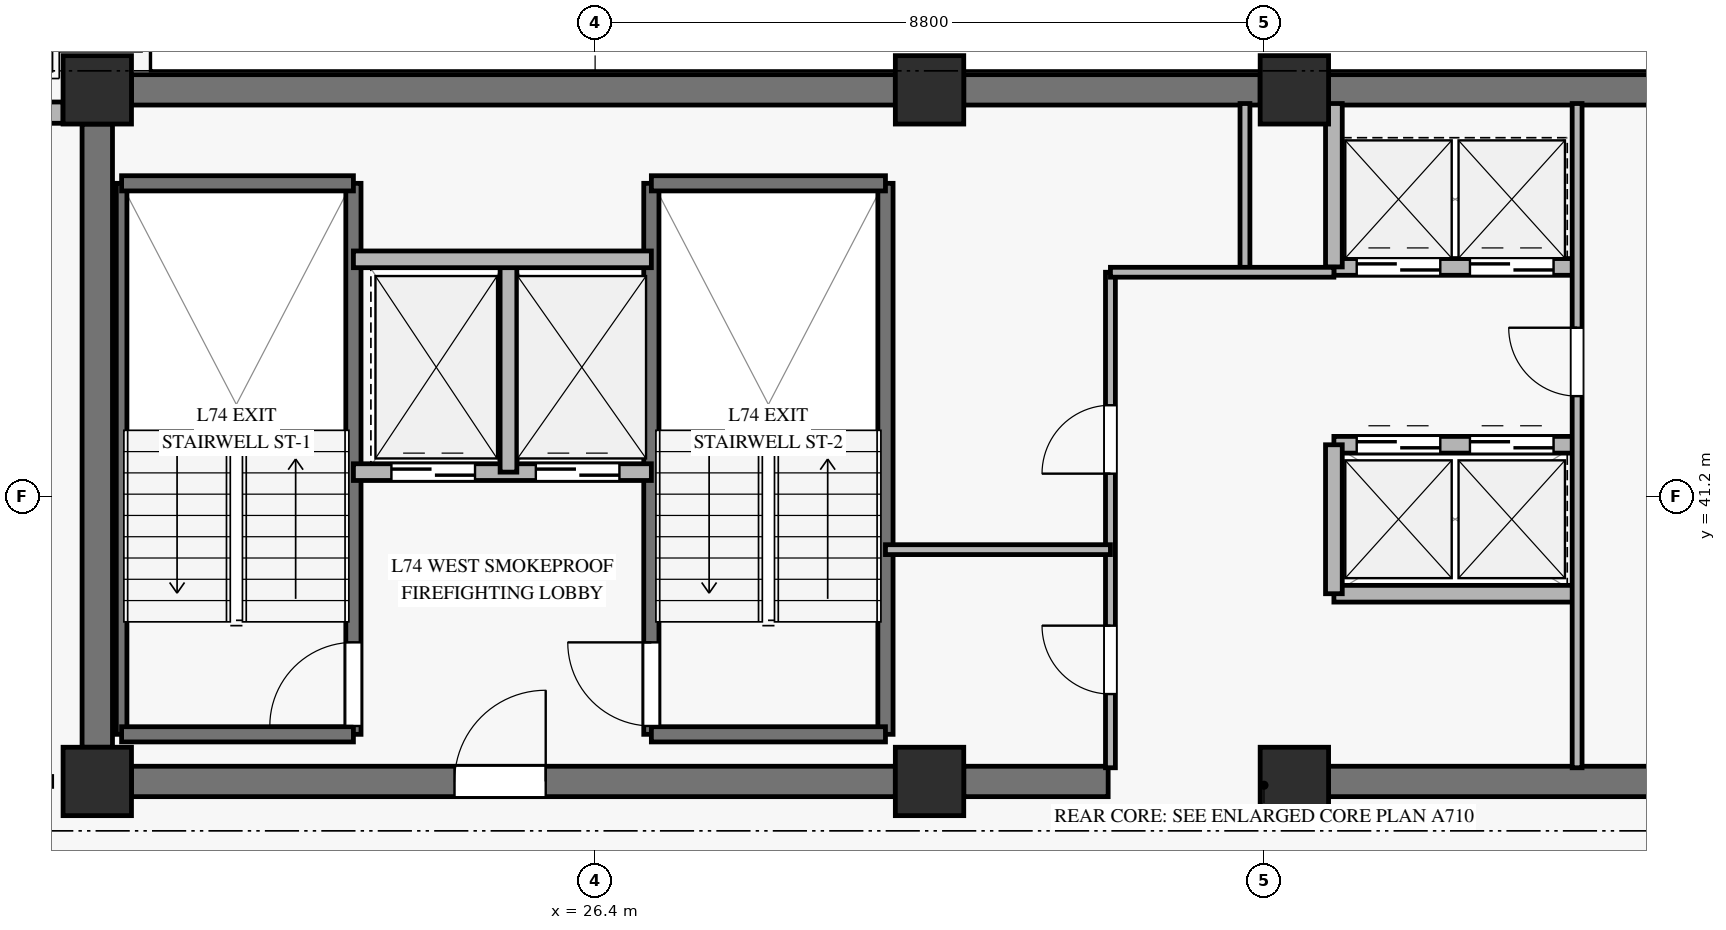
"""IFC4 building model, lengths in metres.
Left out: names, types, materials, properties, quantities, classifications, styles, units other than length and angle.
Written with IfcOpenShell. Run it as: python <this file> out.ifc"""

import sys

from ifc_helpers import new_model, si_unit, direction, frame, frame_2d, origin, origin_2d, place, context, subcontext, project, spatial, rectangle, extrude, source, transform, mapped, element, fill, save


model = new_model("IFC4")
c1 = context("Model", 3, precision=1e-05, world=origin(), true_north=direction((0.0, 1.0)))
c2 = subcontext(c1, "Body", "Model", "MODEL_VIEW")
j1 = project(units=[si_unit("LENGTHUNIT", "METRE"), si_unit("PLANEANGLEUNIT", "RADIAN")], contexts=[c1])
p1 = place(None, origin())
s1 = spatial("IfcSite", under=j1, at=p1, CompositionType="ELEMENT")
p2 = place(p1, origin())
s2 = spatial("IfcBuilding", under=s1, at=p2, CompositionType="ELEMENT")
p3 = place(p2, frame((0.0, 0.0, 290.4)))
s3 = spatial("IfcBuildingStorey", under=s2, at=p3, CompositionType="ELEMENT", Elevation=290.4)
m1 = source(origin(), c2, "Body", "SweptSolid", [
    extrude(rectangle(XDim=0.9, YDim=0.9, at=origin_2d()), origin(), (0.0, 0.0, 1.0), 3.185),
])
for number, where, z_axis, x_axis in (
    (1, (19.85, 37.45, 0.0), (0.0, 0.0, 1.0), (1.0, 0.0, 0.0)),
    (2, (19.85, 46.55, 0.0), (0.0, 0.0, 1.0), (1.0, 0.0, 0.0)),
    (3, (30.8, 37.45, 0.0), (0.0, 0.0, 1.0), (1.0, 0.0, 0.0)),
    (4, (30.8, 46.55, 0.0), (0.0, 0.0, 1.0), (1.0, 0.0, 0.0)),
    (5, (35.6, 37.45, 0.0), (0.0, 0.0, 1.0), (1.0, 0.0, 0.0)),
    (6, (35.6, 46.55, 0.0), (0.0, 0.0, 1.0), (1.0, 0.0, 0.0)),
):
    element("IfcColumn", number, at=place(p3, frame(where, z_axis=z_axis, x_axis=x_axis)), inside=s3, PredefinedType="PILASTER", context=c2, shape_type="MappedRepresentation", body=[
        mapped(m1, transform((0.0, 0.0, 0.0), x_axis=(1.0, 0.0, 0.0), y_axis=(0.0, 1.0, 0.0), z_axis=(0.0, 0.0, 1.0), scale=1.0)),
    ])
p4 = place(p3, frame((20.3, 46.55, 0.0), z_axis=(0.0, 0.0, 1.0), x_axis=(1.0, 0.0, 0.0)))
e7 = element("IfcWall", 7, at=p4, inside=s3, PredefinedType="SHEAR", context=c2, shape_type="SweptSolid", body=[
    extrude(rectangle(XDim=10.05, YDim=0.4, at=frame_2d((5.025, 0.0))), origin(), (0.0, 0.0, 1.0), 3.185),
])
p5 = place(p3, frame((31.25, 46.55, 0.0), z_axis=(0.0, 0.0, 1.0), x_axis=(1.0, 0.0, 0.0)))
e8 = element("IfcWall", 8, at=p5, inside=s3, PredefinedType="SHEAR", context=c2, shape_type="SweptSolid", body=[
    extrude(rectangle(XDim=3.9, YDim=0.4, at=frame_2d((1.95, 0.0))), origin(), (0.0, 0.0, 1.0), 3.185),
])
p6 = place(p3, frame((36.05, 46.55, 0.0), z_axis=(0.0, 0.0, 1.0), x_axis=(1.0, 0.0, 0.0)))
e9 = element("IfcWall", 9, at=p6, inside=s3, PredefinedType="SHEAR", context=c2, shape_type="SweptSolid", body=[
    extrude(rectangle(XDim=7.8, YDim=0.4, at=frame_2d((3.9, 0.0))), origin(), (0.0, 0.0, 1.0), 3.185),
])
p7 = place(p3, frame((20.3, 37.45, 0.0), z_axis=(0.0, 0.0, 1.0), x_axis=(1.0, 0.0, 0.0)))
e10 = element("IfcWall", 10, at=p7, inside=s3, PredefinedType="SHEAR", context=c2, shape_type="SweptSolid", body=[
    extrude(rectangle(XDim=10.05, YDim=0.4, at=frame_2d((5.025, 0.0))), origin(), (0.0, 0.0, 1.0), 3.185),
])
p8 = place(p7, frame((4.25, 0.0, 0.0)))
e11 = element("IfcOpeningElement", 11, at=p8, cuts=e10, PredefinedType="OPENING", context=c2, shape_type="SweptSolid", body=[
    extrude(rectangle(XDim=1.2, YDim=2.15, at=frame_2d((0.6, 1.075))), frame((0.0, 0.21, 0.0), z_axis=(0.0, -1.0, 0.0), x_axis=(1.0, 0.0, 0.0)), (0.0, 0.0, 1.0), 0.42),
])
p9 = place(p3, frame((31.25, 37.45, 0.0), z_axis=(0.0, 0.0, 1.0), x_axis=(1.0, 0.0, 0.0)))
e12 = element("IfcWall", 12, at=p9, inside=s3, PredefinedType="SHEAR", context=c2, shape_type="SweptSolid", body=[
    extrude(rectangle(XDim=1.9, YDim=0.4, at=frame_2d((0.95, 0.0))), origin(), (0.0, 0.0, 1.0), 3.185),
])
p10 = place(p3, frame((36.05, 37.45, 0.0), z_axis=(0.0, 0.0, 1.0), x_axis=(1.0, 0.0, 0.0)))
e13 = element("IfcWall", 13, at=p10, inside=s3, PredefinedType="SHEAR", context=c2, shape_type="SweptSolid", body=[
    extrude(rectangle(XDim=7.8, YDim=0.4, at=frame_2d((3.9, 0.0))), origin(), (0.0, 0.0, 1.0), 3.185),
])
p11 = place(p3, frame((19.85, 37.9, 0.0), z_axis=(0.0, 0.0, 1.0), x_axis=(0.0, 1.0, 0.0)))
e14 = element("IfcWall", 14, at=p11, inside=s3, PredefinedType="SHEAR", context=c2, shape_type="SweptSolid", body=[
    extrude(rectangle(XDim=8.2, YDim=0.4, at=frame_2d((4.1, 0.0))), origin(), (0.0, 0.0, 1.0), 3.185),
])
p12 = place(p3, frame((12.311, 46.25, 0.0), z_axis=(0.0, 0.0, 1.0), x_axis=(1.0, 0.0, 0.0)))
e15 = element("IfcWall", 15, at=p12, inside=s3, PredefinedType="SOLIDWALL", context=c2, shape_type="SweptSolid", body=[
    extrude(rectangle(XDim=7.089, YDim=0.28, at=frame_2d((3.544, 0.0))), origin(), (0.0, 0.0, 1.0), 2.815),
])
p13 = place(p12, frame((2.744, 0.0, 0.45)))
e16 = element("IfcOpeningElement", 16, at=p13, cuts=e15, PredefinedType="OPENING", context=c2, shape_type="SweptSolid", body=[
    extrude(rectangle(XDim=1.6, YDim=2.0, at=frame_2d((0.8, 1.0))), frame((0.0, 0.15, 0.0), z_axis=(0.0, -1.0, 0.0), x_axis=(1.0, 0.0, 0.0)), (0.0, 0.0, 1.0), 0.3),
])
p14 = place(p3, frame((20.17, 38.07, 0.0), z_axis=(0.0, 0.0, 1.0), x_axis=(0.0, 1.0, 0.0)))
e17 = element("IfcWall", 17, at=p14, inside=s3, PredefinedType="SOLIDWALL", context=c2, shape_type="SweptSolid", body=[
    extrude(rectangle(XDim=7.25, YDim=0.14, at=frame_2d((3.625, 0.0))), origin(), (0.0, 0.0, 1.0), 3.4),
])
p15 = place(p3, frame((23.22, 38.07, 0.0), z_axis=(0.0, 0.0, 1.0), x_axis=(0.0, 1.0, 0.0)))
e18 = element("IfcWall", 18, at=p15, inside=s3, PredefinedType="SOLIDWALL", context=c2, shape_type="SweptSolid", body=[
    extrude(rectangle(XDim=7.25, YDim=0.2, at=frame_2d((3.625, 0.0))), origin(), (0.0, 0.0, 1.0), 3.4),
])
p16 = place(p15, frame((0.11, 0.0, 0.0)))
e19 = element("IfcOpeningElement", 19, at=p16, cuts=e18, PredefinedType="OPENING", context=c2, shape_type="SweptSolid", body=[
    extrude(rectangle(XDim=1.1, YDim=2.15, at=frame_2d((0.55, 1.075))), frame((0.0, 0.11, 0.0), z_axis=(0.0, -1.0, 0.0), x_axis=(1.0, 0.0, 0.0)), (0.0, 0.0, 1.0), 0.22),
])
for number, where, z_axis, x_axis in (
    (20, (20.17, 45.32, 0.0), (0.0, 0.0, 1.0), (1.0, 0.0, 0.0)),
    (21, (20.17, 38.07, 0.0), (0.0, 0.0, 1.0), (1.0, 0.0, 0.0)),
):
    element("IfcWall", number, at=place(p3, frame(where, z_axis=z_axis, x_axis=x_axis)), inside=s3, PredefinedType="SOLIDWALL", context=c2, shape_type="SweptSolid", body=[
        extrude(rectangle(XDim=3.05, YDim=0.2, at=frame_2d((1.525, 0.0))), origin(), (0.0, 0.0, 1.0), 3.4),
    ])
p17 = place(p3, frame((27.14, 38.07, 0.0), z_axis=(0.0, 0.0, 1.0), x_axis=(0.0, 1.0, 0.0)))
e22 = element("IfcWall", 22, at=p17, inside=s3, PredefinedType="SOLIDWALL", context=c2, shape_type="SweptSolid", body=[
    extrude(rectangle(XDim=7.25, YDim=0.2, at=frame_2d((3.625, 0.0))), origin(), (0.0, 0.0, 1.0), 3.4),
])
p18 = place(p17, frame((0.11, 0.0, 0.0)))
e23 = element("IfcOpeningElement", 23, at=p18, cuts=e22, PredefinedType="OPENING", context=c2, shape_type="SweptSolid", body=[
    extrude(rectangle(XDim=1.1, YDim=2.15, at=frame_2d((0.55, 1.075))), frame((0.0, 0.11, 0.0), z_axis=(0.0, -1.0, 0.0), x_axis=(1.0, 0.0, 0.0)), (0.0, 0.0, 1.0), 0.22),
])
p19 = place(p3, frame((30.22, 38.07, 0.0), z_axis=(0.0, 0.0, 1.0), x_axis=(0.0, 1.0, 0.0)))
e24 = element("IfcWall", 24, at=p19, inside=s3, PredefinedType="SOLIDWALL", context=c2, shape_type="SweptSolid", body=[
    extrude(rectangle(XDim=7.25, YDim=0.2, at=frame_2d((3.625, 0.0))), origin(), (0.0, 0.0, 1.0), 3.4),
])
for number, where, z_axis, x_axis in (
    (25, (27.14, 45.32, 0.0), (0.0, 0.0, 1.0), (1.0, 0.0, 0.0)),
    (26, (27.14, 38.07, 0.0), (0.0, 0.0, 1.0), (1.0, 0.0, 0.0)),
):
    element("IfcWall", number, at=place(p3, frame(where, z_axis=z_axis, x_axis=x_axis)), inside=s3, PredefinedType="SOLIDWALL", context=c2, shape_type="SweptSolid", body=[
        extrude(rectangle(XDim=3.08, YDim=0.2, at=frame_2d((1.54, 0.0))), origin(), (0.0, 0.0, 1.0), 3.4),
    ])
p20 = place(p3, frame((23.22, 41.52, 0.0), z_axis=(0.0, 0.0, 1.0), x_axis=(1.0, 0.0, 0.0)))
e27 = element("IfcWall", 27, at=p20, inside=s3, PredefinedType="SOLIDWALL", context=c2, shape_type="SweptSolid", body=[
    extrude(rectangle(XDim=3.92, YDim=0.22, at=frame_2d((1.96, 0.0))), origin(), (0.0, 0.0, 1.0), 3.185),
])
p21 = place(p20, frame((0.5, 0.0, 0.0)))
e28 = element("IfcOpeningElement", 28, at=p21, cuts=e27, PredefinedType="OPENING", context=c2, shape_type="SweptSolid", body=[
    extrude(rectangle(XDim=1.1, YDim=2.2, at=frame_2d((0.55, 1.1))), frame((0.0, 0.12, 0.0), z_axis=(0.0, -1.0, 0.0), x_axis=(1.0, 0.0, 0.0)), (0.0, 0.0, 1.0), 0.24),
])
p22 = place(p20, frame((2.4, 0.0, 0.0)))
e29 = element("IfcOpeningElement", 29, at=p22, cuts=e27, PredefinedType="OPENING", context=c2, shape_type="SweptSolid", body=[
    extrude(rectangle(XDim=1.1, YDim=2.2, at=frame_2d((0.55, 1.1))), frame((0.0, 0.12, 0.0), z_axis=(0.0, -1.0, 0.0), x_axis=(1.0, 0.0, 0.0)), (0.0, 0.0, 1.0), 0.24),
])
p23 = place(p3, frame((25.26, 41.52, 0.0), z_axis=(0.0, 0.0, 1.0), x_axis=(0.0, 1.0, 0.0)))
e30 = element("IfcWall", 30, at=p23, inside=s3, PredefinedType="SOLIDWALL", context=c2, shape_type="SweptSolid", body=[
    extrude(rectangle(XDim=2.8, YDim=0.22, at=frame_2d((1.4, 0.0))), origin(), (0.0, 0.0, 1.0), 3.185),
])
p24 = place(p3, frame((23.22, 44.32, 0.0), z_axis=(0.0, 0.0, 1.0), x_axis=(1.0, 0.0, 0.0)))
e31 = element("IfcWall", 31, at=p24, inside=s3, PredefinedType="SOLIDWALL", context=c2, shape_type="SweptSolid", body=[
    extrude(rectangle(XDim=3.92, YDim=0.22, at=frame_2d((1.96, 0.0))), origin(), (0.0, 0.0, 1.0), 3.185),
])
p25 = place(p3, frame((36.12, 44.22, 0.0), z_axis=(0.0, 0.0, 1.0), x_axis=(1.0, 0.0, 0.0)))
e32 = element("IfcWall", 32, at=p25, inside=s3, PredefinedType="SOLIDWALL", context=c2, shape_type="SweptSolid", body=[
    extrude(rectangle(XDim=3.2, YDim=0.22, at=frame_2d((1.6, 0.0))), origin(), (0.0, 0.0, 1.0), 3.185),
])
p26 = place(p25, frame((0.3, 0.0, 0.0)))
e33 = element("IfcOpeningElement", 33, at=p26, cuts=e32, PredefinedType="OPENING", context=c2, shape_type="SweptSolid", body=[
    extrude(rectangle(XDim=1.1, YDim=2.2, at=frame_2d((0.55, 1.1))), frame((0.0, 0.12, 0.0), z_axis=(0.0, -1.0, 0.0), x_axis=(1.0, 0.0, 0.0)), (0.0, 0.0, 1.0), 0.24),
])
p27 = place(p25, frame((1.79, 0.0, 0.0)))
e34 = element("IfcOpeningElement", 34, at=p27, cuts=e32, PredefinedType="OPENING", context=c2, shape_type="SweptSolid", body=[
    extrude(rectangle(XDim=1.1, YDim=2.2, at=frame_2d((0.55, 1.1))), frame((0.0, 0.12, 0.0), z_axis=(0.0, -1.0, 0.0), x_axis=(1.0, 0.0, 0.0)), (0.0, 0.0, 1.0), 0.24),
])
p28 = place(p3, frame((36.12, 41.88, 0.0), z_axis=(0.0, 0.0, 1.0), x_axis=(1.0, 0.0, 0.0)))
e35 = element("IfcWall", 35, at=p28, inside=s3, PredefinedType="SOLIDWALL", context=c2, shape_type="SweptSolid", body=[
    extrude(rectangle(XDim=3.2, YDim=0.22, at=frame_2d((1.6, 0.0))), origin(), (0.0, 0.0, 1.0), 3.185),
])
p29 = place(p28, frame((0.3, 0.0, 0.0)))
e36 = element("IfcOpeningElement", 36, at=p29, cuts=e35, PredefinedType="OPENING", context=c2, shape_type="SweptSolid", body=[
    extrude(rectangle(XDim=1.1, YDim=2.2, at=frame_2d((0.55, 1.1))), frame((0.0, 0.12, 0.0), z_axis=(0.0, -1.0, 0.0), x_axis=(1.0, 0.0, 0.0)), (0.0, 0.0, 1.0), 0.24),
])
p30 = place(p28, frame((1.79, 0.0, 0.0)))
e37 = element("IfcOpeningElement", 37, at=p30, cuts=e35, PredefinedType="OPENING", context=c2, shape_type="SweptSolid", body=[
    extrude(rectangle(XDim=1.1, YDim=2.2, at=frame_2d((0.55, 1.1))), frame((0.0, 0.12, 0.0), z_axis=(0.0, -1.0, 0.0), x_axis=(1.0, 0.0, 0.0)), (0.0, 0.0, 1.0), 0.24),
])
p31 = place(p3, frame((36.12, 39.92, 0.0), z_axis=(0.0, 0.0, 1.0), x_axis=(1.0, 0.0, 0.0)))
e38 = element("IfcWall", 38, at=p31, inside=s3, PredefinedType="SOLIDWALL", context=c2, shape_type="SweptSolid", body=[
    extrude(rectangle(XDim=3.2, YDim=0.22, at=frame_2d((1.6, 0.0))), origin(), (0.0, 0.0, 1.0), 3.185),
])
p32 = place(p3, frame((36.12, 39.92, 0.0), z_axis=(0.0, 0.0, 1.0), x_axis=(0.0, 1.0, 0.0)))
e39 = element("IfcWall", 39, at=p32, inside=s3, PredefinedType="SOLIDWALL", context=c2, shape_type="SweptSolid", body=[
    extrude(rectangle(XDim=1.96, YDim=0.22, at=frame_2d((0.98, 0.0))), origin(), (0.0, 0.0, 1.0), 3.185),
])
p33 = place(p3, frame((36.12, 44.22, 0.0), z_axis=(0.0, 0.0, 1.0), x_axis=(0.0, 1.0, 0.0)))
e40 = element("IfcWall", 40, at=p33, inside=s3, PredefinedType="SOLIDWALL", context=c2, shape_type="SweptSolid", body=[
    extrude(rectangle(XDim=2.15, YDim=0.22, at=frame_2d((1.075, 0.0))), origin(), (0.0, 0.0, 1.0), 3.185),
])
p34 = place(p3, frame((33.18, 37.63, 0.0), z_axis=(0.0, 0.0, 1.0), x_axis=(0.0, 1.0, 0.0)))
e41 = element("IfcWall", 41, at=p34, inside=s3, PredefinedType="PARTITIONING", context=c2, shape_type="SweptSolid", body=[
    extrude(rectangle(XDim=6.52, YDim=0.13, at=frame_2d((3.26, 0.0))), origin(), (0.0, 0.0, 1.0), 2.27),
])
p35 = place(p34, frame((0.97, 0.0, 0.0)))
e42 = element("IfcOpeningElement", 42, at=p35, cuts=e41, PredefinedType="OPENING", context=c2, shape_type="SweptSolid", body=[
    extrude(rectangle(XDim=0.9, YDim=2.1, at=frame_2d((0.45, 1.05))), frame((0.0, 0.075, 0.0), z_axis=(0.0, -1.0, 0.0), x_axis=(1.0, 0.0, 0.0)), (0.0, 0.0, 1.0), 0.15),
])
p36 = place(p34, frame((3.87, 0.0, 0.0)))
e43 = element("IfcOpeningElement", 43, at=p36, cuts=e41, PredefinedType="OPENING", context=c2, shape_type="SweptSolid", body=[
    extrude(rectangle(XDim=0.9, YDim=2.1, at=frame_2d((0.45, 1.05))), frame((0.0, 0.075, 0.0), z_axis=(0.0, -1.0, 0.0), x_axis=(1.0, 0.0, 0.0)), (0.0, 0.0, 1.0), 0.15),
])
p37 = place(p3, frame((34.95, 44.15, 0.0), z_axis=(0.0, 0.0, 1.0), x_axis=(0.0, 1.0, 0.0)))
e44 = element("IfcWall", 44, at=p37, inside=s3, PredefinedType="PARTITIONING", context=c2, shape_type="SweptSolid", body=[
    extrude(rectangle(XDim=2.22, YDim=0.13, at=frame_2d((1.11, 0.0))), origin(), (0.0, 0.0, 1.0), 3.185),
])
p38 = place(p3, frame((33.18, 44.15, 0.0), z_axis=(0.0, 0.0, 1.0), x_axis=(1.0, 0.0, 0.0)))
e45 = element("IfcWall", 45, at=p38, inside=s3, PredefinedType="PARTITIONING", context=c2, shape_type="SweptSolid", body=[
    extrude(rectangle(XDim=2.94, YDim=0.13, at=frame_2d((1.47, 0.0))), origin(), (0.0, 0.0, 1.0), 2.47),
])
p39 = place(p3, frame((39.32, 37.63, 0.0), z_axis=(0.0, 0.0, 1.0), x_axis=(0.0, 1.0, 0.0)))
e46 = element("IfcWall", 46, at=p39, inside=s3, PredefinedType="PARTITIONING", context=c2, shape_type="SweptSolid", body=[
    extrude(rectangle(XDim=8.74, YDim=0.13, at=frame_2d((4.37, 0.0))), origin(), (0.0, 0.0, 1.0), 3.185),
])
p40 = place(p39, frame((4.89, 0.0, 0.0)))
e47 = element("IfcOpeningElement", 47, at=p40, cuts=e46, PredefinedType="OPENING", context=c2, shape_type="SweptSolid", body=[
    extrude(rectangle(XDim=0.9, YDim=2.1, at=frame_2d((0.45, 1.05))), frame((0.0, 0.075, 0.0), z_axis=(0.0, -1.0, 0.0), x_axis=(1.0, 0.0, 0.0)), (0.0, 0.0, 1.0), 0.15),
])
p41 = place(p3, frame((30.22, 40.5, 0.0), z_axis=(0.0, 0.0, 1.0), x_axis=(1.0, 0.0, 0.0)))
e48 = element("IfcWall", 48, at=p41, inside=s3, PredefinedType="PARTITIONING", context=c2, shape_type="SweptSolid", body=[
    extrude(rectangle(XDim=2.96, YDim=0.13, at=frame_2d((1.48, 0.0))), origin(), (0.0, 0.0, 1.0), 2.47),
])
m2 = source(origin(), c2, "Body", "SweptSolid", [
    extrude(rectangle(XDim=1.1, YDim=2.15, at=frame_2d((0.55, 1.075))), frame((0.0, 0.025, 0.0), z_axis=(0.0, -1.0, 0.0), x_axis=(1.0, 0.0, 0.0)), (0.0, 0.0, 1.0), 0.05),
])
p42 = place(p16, origin())
e49 = element("IfcDoor", 49, at=p42, inside=s3, OperationType="SINGLE_SWING_LEFT", PredefinedType="DOOR", context=c2, shape_type="MappedRepresentation", body=[
    mapped(m2, transform((0.0, 0.0, 0.0), x_axis=(1.0, 0.0, 0.0), y_axis=(0.0, 1.0, 0.0), z_axis=(0.0, 0.0, 1.0), scale=1.0)),
])
fill(e19, e49)
p43 = place(p18, origin())
e50 = element("IfcDoor", 50, at=p43, inside=s3, OperationType="SINGLE_SWING_RIGHT", PredefinedType="DOOR", context=c2, shape_type="MappedRepresentation", body=[
    mapped(m2, transform((0.0, 0.0, 0.0), x_axis=(1.0, 0.0, 0.0), y_axis=(0.0, 1.0, 0.0), z_axis=(0.0, 0.0, 1.0), scale=1.0)),
])
fill(e23, e50)
m3 = source(origin(), c2, "Body", "SweptSolid", [
    extrude(rectangle(XDim=1.1, YDim=2.2, at=frame_2d((0.55, 1.1))), frame((0.0, 0.025, 0.0), z_axis=(0.0, -1.0, 0.0), x_axis=(1.0, 0.0, 0.0)), (0.0, 0.0, 1.0), 0.05),
])
p44 = place(p21, origin())
e51 = element("IfcDoor", 51, at=p44, inside=s3, OperationType="SLIDING_TO_LEFT", PredefinedType="DOOR", context=c2, shape_type="MappedRepresentation", body=[
    mapped(m3, transform((0.0, 0.0, 0.0), x_axis=(1.0, 0.0, 0.0), y_axis=(0.0, 1.0, 0.0), z_axis=(0.0, 0.0, 1.0), scale=1.0)),
])
fill(e28, e51)
p45 = place(p22, origin())
e52 = element("IfcDoor", 52, at=p45, inside=s3, OperationType="SLIDING_TO_LEFT", PredefinedType="DOOR", context=c2, shape_type="MappedRepresentation", body=[
    mapped(m3, transform((0.0, 0.0, 0.0), x_axis=(1.0, 0.0, 0.0), y_axis=(0.0, 1.0, 0.0), z_axis=(0.0, 0.0, 1.0), scale=1.0)),
])
fill(e29, e52)
m4 = source(origin(), c2, "Body", "SweptSolid", [
    extrude(rectangle(XDim=1.2, YDim=2.15, at=frame_2d((0.6, 1.075))), frame((0.0, 0.025, 0.0), z_axis=(0.0, -1.0, 0.0), x_axis=(1.0, 0.0, 0.0)), (0.0, 0.0, 1.0), 0.05),
])
p46 = place(p8, origin())
e53 = element("IfcDoor", 53, at=p46, inside=s3, OperationType="SINGLE_SWING_RIGHT", PredefinedType="DOOR", context=c2, shape_type="MappedRepresentation", body=[
    mapped(m4, transform((0.0, 0.0, 0.0), x_axis=(1.0, 0.0, 0.0), y_axis=(0.0, 1.0, 0.0), z_axis=(0.0, 0.0, 1.0), scale=1.0)),
])
fill(e11, e53)
p47 = place(p26, origin())
e54 = element("IfcDoor", 54, at=p47, inside=s3, OperationType="SLIDING_TO_LEFT", PredefinedType="DOOR", context=c2, shape_type="MappedRepresentation", body=[
    mapped(m3, transform((0.0, 0.0, 0.0), x_axis=(1.0, 0.0, 0.0), y_axis=(0.0, 1.0, 0.0), z_axis=(0.0, 0.0, 1.0), scale=1.0)),
])
fill(e33, e54)
p48 = place(p27, origin())
e55 = element("IfcDoor", 55, at=p48, inside=s3, OperationType="SLIDING_TO_LEFT", PredefinedType="DOOR", context=c2, shape_type="MappedRepresentation", body=[
    mapped(m3, transform((0.0, 0.0, 0.0), x_axis=(1.0, 0.0, 0.0), y_axis=(0.0, 1.0, 0.0), z_axis=(0.0, 0.0, 1.0), scale=1.0)),
])
fill(e34, e55)
p49 = place(p29, origin())
e56 = element("IfcDoor", 56, at=p49, inside=s3, OperationType="SLIDING_TO_LEFT", PredefinedType="DOOR", context=c2, shape_type="MappedRepresentation", body=[
    mapped(m3, transform((0.0, 0.0, 0.0), x_axis=(1.0, 0.0, 0.0), y_axis=(0.0, 1.0, 0.0), z_axis=(0.0, 0.0, 1.0), scale=1.0)),
])
fill(e36, e56)
p50 = place(p30, origin())
e57 = element("IfcDoor", 57, at=p50, inside=s3, OperationType="SLIDING_TO_LEFT", PredefinedType="DOOR", context=c2, shape_type="MappedRepresentation", body=[
    mapped(m3, transform((0.0, 0.0, 0.0), x_axis=(1.0, 0.0, 0.0), y_axis=(0.0, 1.0, 0.0), z_axis=(0.0, 0.0, 1.0), scale=1.0)),
])
fill(e37, e57)
m5 = source(origin(), c2, "Body", "SweptSolid", [
    extrude(rectangle(XDim=0.9, YDim=2.1, at=frame_2d((0.45, 1.05))), frame((0.0, 0.025, 0.0), z_axis=(0.0, -1.0, 0.0), x_axis=(1.0, 0.0, 0.0)), (0.0, 0.0, 1.0), 0.05),
])
p51 = place(p35, origin())
e58 = element("IfcDoor", 58, at=p51, inside=s3, OperationType="SINGLE_SWING_RIGHT", PredefinedType="DOOR", context=c2, shape_type="MappedRepresentation", body=[
    mapped(m5, transform((0.0, 0.0, 0.0), x_axis=(1.0, 0.0, 0.0), y_axis=(0.0, 1.0, 0.0), z_axis=(0.0, 0.0, 1.0), scale=1.0)),
])
fill(e42, e58)
p52 = place(p36, origin())
e59 = element("IfcDoor", 59, at=p52, inside=s3, OperationType="SINGLE_SWING_LEFT", PredefinedType="DOOR", context=c2, shape_type="MappedRepresentation", body=[
    mapped(m5, transform((0.0, 0.0, 0.0), x_axis=(1.0, 0.0, 0.0), y_axis=(0.0, 1.0, 0.0), z_axis=(0.0, 0.0, 1.0), scale=1.0)),
])
fill(e43, e59)
p53 = place(p40, origin())
e60 = element("IfcDoor", 60, at=p53, inside=s3, OperationType="SINGLE_SWING_RIGHT", PredefinedType="DOOR", context=c2, shape_type="MappedRepresentation", body=[
    mapped(m5, transform((0.0, 0.0, 0.0), x_axis=(1.0, 0.0, 0.0), y_axis=(0.0, 1.0, 0.0), z_axis=(0.0, 0.0, 1.0), scale=1.0)),
])
fill(e47, e60)
save(model, sys.argv[1])
